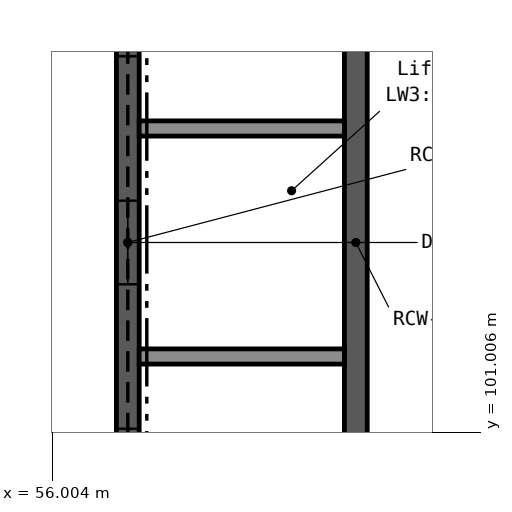
"""IFC4 building model, lengths in metres.
Left out: names, types, materials, properties, quantities, classifications, styles, units other than length and angle.
Written with IfcOpenShell. Run it as: python <this file> out.ifc"""

import sys

from ifc_helpers import new_model, si_unit, direction, frame, frame_2d, origin, place, context, subcontext, project, spatial, rectangle, extrude, element, fill, save


model = new_model("IFC4")
c1 = context("Model", 3, precision=1e-05, world=origin(), true_north=direction((0.0, 1.0)))
c2 = subcontext(c1, "Body", "Model", "MODEL_VIEW")
j1 = project(units=[si_unit("LENGTHUNIT", "METRE"), si_unit("PLANEANGLEUNIT", "RADIAN")], contexts=[c1])
p1 = place(None, origin())
s1 = spatial("IfcSite", under=j1, at=p1, CompositionType="ELEMENT")
p2 = place(p1, origin())
s2 = spatial("IfcBuilding", under=s1, at=p2, CompositionType="ELEMENT")
p3 = place(p2, frame((0.0, 0.0, 21.6)))
s3 = spatial("IfcBuildingStorey", under=s2, at=p3, CompositionType="ELEMENT", Elevation=21.6)
p4 = place(p3, frame((57.0, 99.15, 0.0), z_axis=(0.0, 0.0, 1.0), x_axis=(0.0, 1.0, 0.0)))
e1 = element("IfcWall", 1, at=p4, inside=s3, PredefinedType="SHEAR", context=c2, shape_type="SweptSolid", body=[
    extrude(rectangle(XDim=8.7, YDim=0.3, at=frame_2d((4.35, 0.0))), origin(), (0.0, 0.0, 1.0), 5.4),
])
p5 = place(p4, frame((0.8, 0.0, 0.0)))
e2 = element("IfcOpeningElement", 2, at=p5, cuts=e1, PredefinedType="OPENING", context=c2, shape_type="SweptSolid", body=[
    extrude(rectangle(XDim=1.1, YDim=2.1, at=frame_2d((0.55, 1.05))), frame((0.0, 0.161, 0.0), z_axis=(0.0, -1.0, 0.0), x_axis=(1.0, 0.0, 0.0)), (0.0, 0.0, 1.0), 0.322),
])
p6 = place(p4, frame((3.8, 0.0, 0.0)))
e3 = element("IfcOpeningElement", 3, at=p6, cuts=e1, PredefinedType="OPENING", context=c2, shape_type="SweptSolid", body=[
    extrude(rectangle(XDim=1.1, YDim=2.1, at=frame_2d((0.55, 1.05))), frame((0.0, 0.161, 0.0), z_axis=(0.0, -1.0, 0.0), x_axis=(1.0, 0.0, 0.0)), (0.0, 0.0, 1.0), 0.322),
])
p7 = place(p4, frame((6.8, 0.0, 0.0)))
e4 = element("IfcOpeningElement", 4, at=p7, cuts=e1, PredefinedType="OPENING", context=c2, shape_type="SweptSolid", body=[
    extrude(rectangle(XDim=1.1, YDim=2.1, at=frame_2d((0.55, 1.05))), frame((0.0, 0.161, 0.0), z_axis=(0.0, -1.0, 0.0), x_axis=(1.0, 0.0, 0.0)), (0.0, 0.0, 1.0), 0.322),
])
p8 = place(p3, frame((60.0, 99.15, 0.0), z_axis=(0.0, 0.0, 1.0), x_axis=(0.0, 1.0, 0.0)))
e5 = element("IfcWall", 5, at=p8, inside=s3, PredefinedType="SHEAR", context=c2, shape_type="SweptSolid", body=[
    extrude(rectangle(XDim=8.7, YDim=0.3, at=frame_2d((4.35, 0.0))), origin(), (0.0, 0.0, 1.0), 5.4),
])
for number, where, z_axis, x_axis in (
    (6, (57.15, 102.0, 0.0), (0.0, 0.0, 1.0), (1.0, 0.0, 0.0)),
    (7, (57.15, 105.0, 0.0), (0.0, 0.0, 1.0), (1.0, 0.0, 0.0)),
):
    element("IfcWall", number, at=place(p3, frame(where, z_axis=z_axis, x_axis=x_axis)), inside=s3, PredefinedType="SOLIDWALL", context=c2, shape_type="SweptSolid", body=[
        extrude(rectangle(XDim=2.7, YDim=0.2, at=frame_2d((1.35, 0.0))), origin(), (0.0, 0.0, 1.0), 5.4),
    ])
p9 = place(p5, origin())
e8 = element("IfcDoor", 8, at=p9, inside=s3, OperationType="DOUBLE_DOOR_SLIDING", PredefinedType="DOOR", context=c2, shape_type="SweptSolid", body=[
    extrude(rectangle(XDim=1.1, YDim=2.1, at=frame_2d((0.55, 1.05))), frame((0.0, 0.025, 0.0), z_axis=(0.0, -1.0, 0.0), x_axis=(1.0, 0.0, 0.0)), (0.0, 0.0, 1.0), 0.05),
])
fill(e2, e8)
p10 = place(p6, origin())
e9 = element("IfcDoor", 9, at=p10, inside=s3, OperationType="DOUBLE_DOOR_SLIDING", PredefinedType="DOOR", context=c2, shape_type="SweptSolid", body=[
    extrude(rectangle(XDim=1.1, YDim=2.1, at=frame_2d((0.55, 1.05))), frame((0.0, 0.025, 0.0), z_axis=(0.0, -1.0, 0.0), x_axis=(1.0, 0.0, 0.0)), (0.0, 0.0, 1.0), 0.05),
])
fill(e3, e9)
p11 = place(p7, origin())
e10 = element("IfcDoor", 10, at=p11, inside=s3, OperationType="DOUBLE_DOOR_SLIDING", PredefinedType="DOOR", context=c2, shape_type="SweptSolid", body=[
    extrude(rectangle(XDim=1.1, YDim=2.1, at=frame_2d((0.55, 1.05))), frame((0.0, 0.025, 0.0), z_axis=(0.0, -1.0, 0.0), x_axis=(1.0, 0.0, 0.0)), (0.0, 0.0, 1.0), 0.05),
])
fill(e4, e10)
save(model, sys.argv[1])
